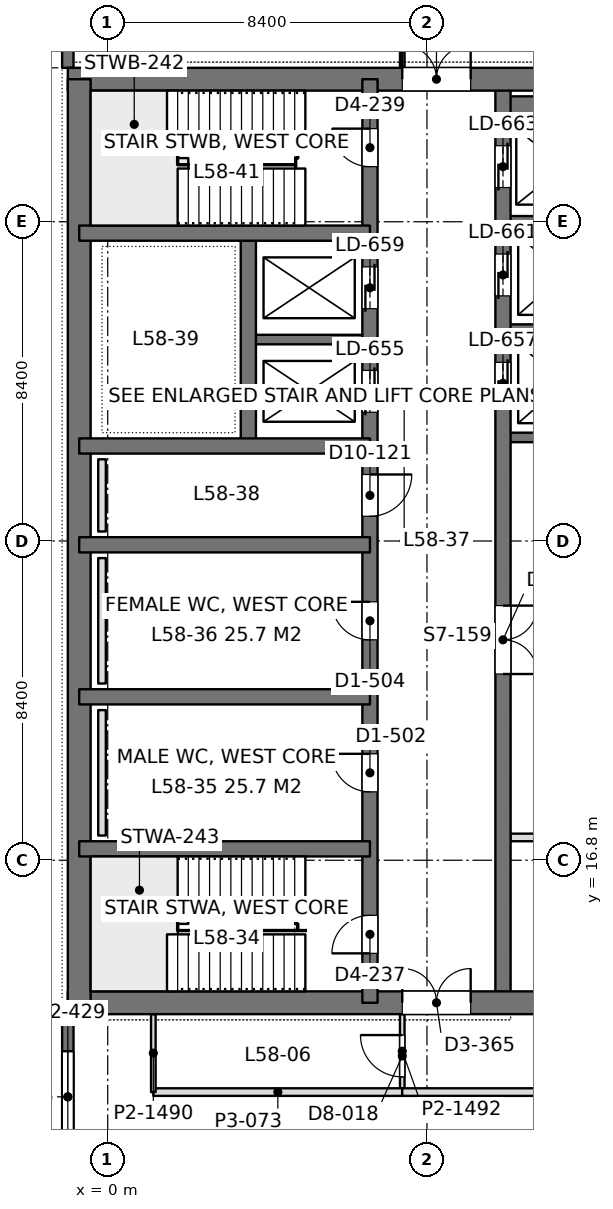
"""IFC4 building model, lengths in metres.
Left out: names, types, materials, properties, quantities, classifications, styles, units other than length and angle.
Written with IfcOpenShell. Run it as: python <this file> out.ifc"""

import sys

from ifc_helpers import new_model, si_unit, direction, frame, frame_2d, origin, place, context, subcontext, project, spatial, rectangle, extrude, element, fill, save


model = new_model("IFC4")
c1 = context("Model", 3, precision=1e-05, world=origin(), true_north=direction((0.0, 1.0)))
c2 = subcontext(c1, "Body", "Model", "MODEL_VIEW")
j1 = project(units=[si_unit("LENGTHUNIT", "METRE"), si_unit("PLANEANGLEUNIT", "RADIAN")], contexts=[c1])
p1 = place(None, origin())
s1 = spatial("IfcSite", under=j1, at=p1, CompositionType="ELEMENT")
p2 = place(p1, origin())
s2 = spatial("IfcBuilding", under=s1, at=p2, CompositionType="ELEMENT")
p3 = place(p2, frame((0.0, 0.0, 254.7)))
s3 = spatial("IfcBuildingStorey", under=s2, at=p3, CompositionType="ELEMENT", Elevation=254.7)
p4 = place(p3, frame((-1.05, 13.05, 0.0), z_axis=(0.0, 0.0, 1.0), x_axis=(1.0, 0.0, 0.0)))
e1 = element("IfcWall", 1, at=p4, inside=s3, PredefinedType="SHEAR", context=c2, shape_type="SweptSolid", body=[
    extrude(rectangle(XDim=17.7, YDim=0.6, at=frame_2d((8.85, 0.0))), origin(), (0.0, 0.0, 1.0), 4.5),
])
p5 = place(p4, frame((8.8, 0.0, 0.0)))
e2 = element("IfcOpeningElement", 2, at=p5, cuts=e1, PredefinedType="OPENING", context=c2, shape_type="SweptSolid", body=[
    extrude(rectangle(XDim=1.8, YDim=2.4, at=frame_2d((0.9, 1.2))), frame((0.0, 0.31, 0.0), z_axis=(0.0, -1.0, 0.0), x_axis=(1.0, 0.0, 0.0)), (0.0, 0.0, 1.0), 0.62),
])
p6 = place(p3, frame((-1.05, 37.35, 0.0), z_axis=(0.0, 0.0, 1.0), x_axis=(1.0, 0.0, 0.0)))
e3 = element("IfcWall", 3, at=p6, inside=s3, PredefinedType="SHEAR", context=c2, shape_type="SweptSolid", body=[
    extrude(rectangle(XDim=17.7, YDim=0.6, at=frame_2d((8.85, 0.0))), origin(), (0.0, 0.0, 1.0), 4.5),
])
p7 = place(p6, frame((8.8, 0.0, 0.0)))
e4 = element("IfcOpeningElement", 4, at=p7, cuts=e3, PredefinedType="OPENING", context=c2, shape_type="SweptSolid", body=[
    extrude(rectangle(XDim=1.8, YDim=2.4, at=frame_2d((0.9, 1.2))), frame((0.0, 0.31, 0.0), z_axis=(0.0, -1.0, 0.0), x_axis=(1.0, 0.0, 0.0)), (0.0, 0.0, 1.0), 0.62),
])
p8 = place(p3, frame((-0.75, 13.05, 0.0), z_axis=(0.0, 0.0, 1.0), x_axis=(0.0, 1.0, 0.0)))
e5 = element("IfcWall", 5, at=p8, inside=s3, PredefinedType="SHEAR", context=c2, shape_type="SweptSolid", body=[
    extrude(rectangle(XDim=24.3, YDim=0.6, at=frame_2d((12.15, 0.0))), origin(), (0.0, 0.0, 1.0), 4.5),
])
p9 = place(p3, frame((6.9, 13.05, 0.0), z_axis=(0.0, 0.0, 1.0), x_axis=(0.0, 1.0, 0.0)))
e6 = element("IfcWall", 6, at=p9, inside=s3, PredefinedType="SHEAR", context=c2, shape_type="SweptSolid", body=[
    extrude(rectangle(XDim=24.3, YDim=0.4, at=frame_2d((12.15, 0.0))), origin(), (0.0, 0.0, 1.0), 4.5),
])
p10 = place(p9, frame((1.3, 0.0, 0.0)))
e7 = element("IfcOpeningElement", 7, at=p10, cuts=e6, PredefinedType="OPENING", context=c2, shape_type="SweptSolid", body=[
    extrude(rectangle(XDim=1.0, YDim=2.2, at=frame_2d((0.5, 1.1))), frame((0.0, 0.21, 0.0), z_axis=(0.0, -1.0, 0.0), x_axis=(1.0, 0.0, 0.0)), (0.0, 0.0, 1.0), 0.42),
])
p11 = place(p9, frame((22.0, 0.0, 0.0)))
e8 = element("IfcOpeningElement", 8, at=p11, cuts=e6, PredefinedType="OPENING", context=c2, shape_type="SweptSolid", body=[
    extrude(rectangle(XDim=1.0, YDim=2.2, at=frame_2d((0.5, 1.1))), frame((0.0, 0.21, 0.0), z_axis=(0.0, -1.0, 0.0), x_axis=(1.0, 0.0, 0.0)), (0.0, 0.0, 1.0), 0.42),
])
p12 = place(p9, frame((5.55, 0.0, 0.0)))
e9 = element("IfcOpeningElement", 9, at=p12, cuts=e6, PredefinedType="OPENING", context=c2, shape_type="SweptSolid", body=[
    extrude(rectangle(XDim=1.0, YDim=2.2, at=frame_2d((0.5, 1.1))), frame((0.0, 0.21, 0.0), z_axis=(0.0, -1.0, 0.0), x_axis=(1.0, 0.0, 0.0)), (0.0, 0.0, 1.0), 0.42),
])
p13 = place(p9, frame((9.55, 0.0, 0.0)))
e10 = element("IfcOpeningElement", 10, at=p13, cuts=e6, PredefinedType="OPENING", context=c2, shape_type="SweptSolid", body=[
    extrude(rectangle(XDim=1.0, YDim=2.2, at=frame_2d((0.5, 1.1))), frame((0.0, 0.21, 0.0), z_axis=(0.0, -1.0, 0.0), x_axis=(1.0, 0.0, 0.0)), (0.0, 0.0, 1.0), 0.42),
])
p14 = place(p9, frame((12.8, 0.0, 0.0)))
e11 = element("IfcOpeningElement", 11, at=p14, cuts=e6, PredefinedType="OPENING", context=c2, shape_type="SweptSolid", body=[
    extrude(rectangle(XDim=1.1, YDim=2.2, at=frame_2d((0.55, 1.1))), frame((0.0, 0.21, 0.0), z_axis=(0.0, -1.0, 0.0), x_axis=(1.0, 0.0, 0.0)), (0.0, 0.0, 1.0), 0.42),
])
p15 = place(p9, frame((15.538, 0.0, 0.0)))
e12 = element("IfcOpeningElement", 12, at=p15, cuts=e6, PredefinedType="OPENING", context=c2, shape_type="SweptSolid", body=[
    extrude(rectangle(XDim=1.1, YDim=2.2, at=frame_2d((0.55, 1.1))), frame((0.0, 0.21, 0.0), z_axis=(0.0, -1.0, 0.0), x_axis=(1.0, 0.0, 0.0)), (0.0, 0.0, 1.0), 0.42),
])
p16 = place(p9, frame((18.262, 0.0, 0.0)))
e13 = element("IfcOpeningElement", 13, at=p16, cuts=e6, PredefinedType="OPENING", context=c2, shape_type="SweptSolid", body=[
    extrude(rectangle(XDim=1.1, YDim=2.2, at=frame_2d((0.55, 1.1))), frame((0.0, 0.21, 0.0), z_axis=(0.0, -1.0, 0.0), x_axis=(1.0, 0.0, 0.0)), (0.0, 0.0, 1.0), 0.42),
])
p17 = place(p3, frame((10.4, 13.05, 0.0), z_axis=(0.0, 0.0, 1.0), x_axis=(0.0, 1.0, 0.0)))
e14 = element("IfcWall", 14, at=p17, inside=s3, PredefinedType="SHEAR", context=c2, shape_type="SweptSolid", body=[
    extrude(rectangle(XDim=24.3, YDim=0.4, at=frame_2d((12.15, 0.0))), origin(), (0.0, 0.0, 1.0), 4.5),
])
p18 = place(p17, frame((15.75, 0.0, 0.0)))
e15 = element("IfcOpeningElement", 15, at=p18, cuts=e14, PredefinedType="OPENING", context=c2, shape_type="SweptSolid", body=[
    extrude(rectangle(XDim=1.1, YDim=2.2, at=frame_2d((0.55, 1.1))), frame((0.0, 0.21, 0.0), z_axis=(0.0, -1.0, 0.0), x_axis=(1.0, 0.0, 0.0)), (0.0, 0.0, 1.0), 0.42),
])
p19 = place(p17, frame((18.6, 0.0, 0.0)))
e16 = element("IfcOpeningElement", 16, at=p19, cuts=e14, PredefinedType="OPENING", context=c2, shape_type="SweptSolid", body=[
    extrude(rectangle(XDim=1.1, YDim=2.2, at=frame_2d((0.55, 1.1))), frame((0.0, 0.21, 0.0), z_axis=(0.0, -1.0, 0.0), x_axis=(1.0, 0.0, 0.0)), (0.0, 0.0, 1.0), 0.42),
])
p20 = place(p17, frame((21.45, 0.0, 0.0)))
e17 = element("IfcOpeningElement", 17, at=p20, cuts=e14, PredefinedType="OPENING", context=c2, shape_type="SweptSolid", body=[
    extrude(rectangle(XDim=1.1, YDim=2.2, at=frame_2d((0.55, 1.1))), frame((0.0, 0.21, 0.0), z_axis=(0.0, -1.0, 0.0), x_axis=(1.0, 0.0, 0.0)), (0.0, 0.0, 1.0), 0.42),
])
p21 = place(p17, frame((8.65, 0.0, 0.0)))
e18 = element("IfcOpeningElement", 18, at=p21, cuts=e14, PredefinedType="OPENING", context=c2, shape_type="SweptSolid", body=[
    extrude(rectangle(XDim=1.8, YDim=2.4, at=frame_2d((0.9, 1.2))), frame((0.0, 0.21, 0.0), z_axis=(0.0, -1.0, 0.0), x_axis=(1.0, 0.0, 0.0)), (0.0, 0.0, 1.0), 0.42),
])
for number, where, z_axis, x_axis in (
    (19, (-0.75, 17.1, 0.0), (0.0, 0.0, 1.0), (1.0, 0.0, 0.0)),
    (20, (-0.75, 21.1, 0.0), (0.0, 0.0, 1.0), (1.0, 0.0, 0.0)),
    (21, (-0.75, 25.1, 0.0), (0.0, 0.0, 1.0), (1.0, 0.0, 0.0)),
    (22, (-0.75, 27.7, 0.0), (0.0, 0.0, 1.0), (1.0, 0.0, 0.0)),
    (23, (-0.75, 33.3, 0.0), (0.0, 0.0, 1.0), (1.0, 0.0, 0.0)),
):
    element("IfcWall", number, at=place(p3, frame(where, z_axis=z_axis, x_axis=x_axis)), inside=s3, PredefinedType="SHEAR", context=c2, shape_type="SweptSolid", body=[
        extrude(rectangle(XDim=7.65, YDim=0.4, at=frame_2d((3.825, 0.0))), origin(), (0.0, 0.0, 1.0), 4.5),
    ])
p22 = place(p3, frame((3.7, 27.7, 0.0), z_axis=(0.0, 0.0, 1.0), x_axis=(0.0, 1.0, 0.0)))
e24 = element("IfcWall", 24, at=p22, inside=s3, PredefinedType="SHEAR", context=c2, shape_type="SweptSolid", body=[
    extrude(rectangle(XDim=5.6, YDim=0.4, at=frame_2d((2.8, 0.0))), origin(), (0.0, 0.0, 1.0), 4.5),
])
p23 = place(p3, frame((3.7, 30.5, 0.0), z_axis=(0.0, 0.0, 1.0), x_axis=(1.0, 0.0, 0.0)))
e25 = element("IfcWall", 25, at=p23, inside=s3, PredefinedType="SHEAR", context=c2, shape_type="SweptSolid", body=[
    extrude(rectangle(XDim=3.2, YDim=0.25, at=frame_2d((1.6, 0.0))), origin(), (0.0, 0.0, 1.0), 4.5),
])
p24 = place(p3, frame((10.4, 27.925, 0.0), z_axis=(0.0, 0.0, 1.0), x_axis=(1.0, 0.0, 0.0)))
e26 = element("IfcWall", 26, at=p24, inside=s3, PredefinedType="SHEAR", context=c2, shape_type="SweptSolid", body=[
    extrude(rectangle(XDim=5.95, YDim=0.25, at=frame_2d((2.975, 0.0))), origin(), (0.0, 0.0, 1.0), 4.5),
])
for number, where, z_axis, x_axis in (
    (27, (10.4, 30.775, 0.0), (0.0, 0.0, 1.0), (1.0, 0.0, 0.0)),
    (28, (10.4, 33.625, 0.0), (0.0, 0.0, 1.0), (1.0, 0.0, 0.0)),
):
    element("IfcWall", number, at=place(p3, frame(where, z_axis=z_axis, x_axis=x_axis)), inside=s3, PredefinedType="SHEAR", context=c2, shape_type="SweptSolid", body=[
        extrude(rectangle(XDim=3.2, YDim=0.25, at=frame_2d((1.6, 0.0))), origin(), (0.0, 0.0, 1.0), 4.5),
    ])
p25 = place(p3, frame((10.4, 36.625, 0.0), z_axis=(0.0, 0.0, 1.0), x_axis=(1.0, 0.0, 0.0)))
e29 = element("IfcWall", 29, at=p25, inside=s3, PredefinedType="SHEAR", context=c2, shape_type="SweptSolid", body=[
    extrude(rectangle(XDim=3.2, YDim=0.55, at=frame_2d((1.6, 0.0))), origin(), (0.0, 0.0, 1.0), 4.5),
])
p26 = place(p3, frame((-1.05, 8.4, 0.0), z_axis=(0.0, 0.0, 1.0), x_axis=(0.0, 1.0, 0.0)))
e30 = element("IfcWall", 30, at=p26, inside=s3, PredefinedType="SOLIDWALL", context=c2, shape_type="SweptSolid", body=[
    extrude(rectangle(XDim=4.35, YDim=0.3, at=frame_2d((2.175, 0.0))), origin(), (0.0, 0.0, 1.0), 4.35),
])
p27 = place(p26, frame((0.975, 0.0, 0.9)))
e31 = element("IfcOpeningElement", 31, at=p27, cuts=e30, PredefinedType="OPENING", context=c2, shape_type="SweptSolid", body=[
    extrude(rectangle(XDim=2.4, YDim=1.9, at=frame_2d((1.2, 0.95))), frame((0.0, 0.16, 0.0), z_axis=(0.0, -1.0, 0.0), x_axis=(1.0, 0.0, 0.0)), (0.0, 0.0, 1.0), 0.32),
])
p28 = place(p3, frame((-1.05, 37.65, 0.0), z_axis=(0.0, 0.0, 1.0), x_axis=(0.0, 1.0, 0.0)))
e32 = element("IfcWall", 32, at=p28, inside=s3, PredefinedType="SOLIDWALL", context=c2, shape_type="SweptSolid", body=[
    extrude(rectangle(XDim=4.35, YDim=0.3, at=frame_2d((2.175, 0.0))), origin(), (0.0, 0.0, 1.0), 4.35),
])
p29 = place(p28, frame((0.975, 0.0, 0.9)))
e33 = element("IfcOpeningElement", 33, at=p29, cuts=e32, PredefinedType="OPENING", context=c2, shape_type="SweptSolid", body=[
    extrude(rectangle(XDim=2.4, YDim=1.9, at=frame_2d((1.2, 0.95))), frame((0.0, 0.16, 0.0), z_axis=(0.0, -1.0, 0.0), x_axis=(1.0, 0.0, 0.0)), (0.0, 0.0, 1.0), 0.32),
])
p30 = place(p3, frame((10.598, 17.4, 0.0), z_axis=(0.0, 0.0, 1.0), x_axis=(1.0, 0.0, 0.0)))
e34 = element("IfcWall", 34, at=p30, inside=s3, PredefinedType="PARTITIONING", context=c2, shape_type="SweptSolid", body=[
    extrude(rectangle(XDim=5.904, YDim=0.2, at=frame_2d((2.952, 0.0))), origin(), (0.0, 0.0, 1.0), 3.8),
])
p31 = place(p3, frame((7.748, 10.7, 0.0), z_axis=(0.0, 0.0, 1.0), x_axis=(1.0, 0.0, 0.0)))
e35 = element("IfcWall", 35, at=p31, inside=s3, PredefinedType="PARTITIONING", context=c2, shape_type="SweptSolid", body=[
    extrude(rectangle(XDim=34.904, YDim=0.2, at=frame_2d((17.452, 0.0))), origin(), (0.0, 0.0, 1.0), 3.8),
])
p32 = place(p31, frame((4.919, 0.0, 0.0)))
e36 = element("IfcOpeningElement", 36, at=p32, cuts=e35, PredefinedType="OPENING", context=c2, shape_type="SweptSolid", body=[
    extrude(rectangle(XDim=1.8, YDim=2.2, at=frame_2d((0.9, 1.1))), frame((0.0, 0.11, 0.0), z_axis=(0.0, -1.0, 0.0), x_axis=(1.0, 0.0, 0.0)), (0.0, 0.0, 1.0), 0.22),
])
p33 = place(p31, frame((10.735, 0.0, 0.0)))
e37 = element("IfcOpeningElement", 37, at=p33, cuts=e35, PredefinedType="OPENING", context=c2, shape_type="SweptSolid", body=[
    extrude(rectangle(XDim=1.8, YDim=2.2, at=frame_2d((0.9, 1.1))), frame((0.0, 0.11, 0.0), z_axis=(0.0, -1.0, 0.0), x_axis=(1.0, 0.0, 0.0)), (0.0, 0.0, 1.0), 0.22),
])
p34 = place(p31, frame((22.369, 0.0, 0.0)))
e38 = element("IfcOpeningElement", 38, at=p34, cuts=e35, PredefinedType="OPENING", context=c2, shape_type="SweptSolid", body=[
    extrude(rectangle(XDim=1.8, YDim=2.2, at=frame_2d((0.9, 1.1))), frame((0.0, 0.11, 0.0), z_axis=(0.0, -1.0, 0.0), x_axis=(1.0, 0.0, 0.0)), (0.0, 0.0, 1.0), 0.22),
])
p35 = place(p31, frame((28.185, 0.0, 0.0)))
e39 = element("IfcOpeningElement", 39, at=p35, cuts=e35, PredefinedType="OPENING", context=c2, shape_type="SweptSolid", body=[
    extrude(rectangle(XDim=1.8, YDim=2.2, at=frame_2d((0.9, 1.1))), frame((0.0, 0.11, 0.0), z_axis=(0.0, -1.0, 0.0), x_axis=(1.0, 0.0, 0.0)), (0.0, 0.0, 1.0), 0.22),
])
p36 = place(p3, frame((7.75, 10.798, 0.0), z_axis=(0.0, 0.0, 1.0), x_axis=(0.0, 1.0, 0.0)))
e40 = element("IfcWall", 40, at=p36, inside=s3, PredefinedType="PARTITIONING", context=c2, shape_type="SweptSolid", body=[
    extrude(rectangle(XDim=1.954, YDim=0.12, at=frame_2d((0.977, 0.0))), origin(), (0.0, 0.0, 1.0), 4.35),
])
p37 = place(p36, frame((0.302, 0.0, 0.0)))
e41 = element("IfcOpeningElement", 41, at=p37, cuts=e40, PredefinedType="OPENING", context=c2, shape_type="SweptSolid", body=[
    extrude(rectangle(XDim=1.1, YDim=2.4, at=frame_2d((0.55, 1.2))), frame((0.0, 0.07, 0.0), z_axis=(0.0, -1.0, 0.0), x_axis=(1.0, 0.0, 0.0)), (0.0, 0.0, 1.0), 0.14),
])
p38 = place(p3, frame((1.2, 10.7, 0.0), z_axis=(0.0, 0.0, 1.0), x_axis=(1.0, 0.0, 0.0)))
e42 = element("IfcWall", 42, at=p38, inside=s3, PredefinedType="PARTITIONING", context=c2, shape_type="SweptSolid", body=[
    extrude(rectangle(XDim=6.552, YDim=0.2, at=frame_2d((3.276, 0.0))), origin(), (0.0, 0.0, 1.0), 4.35),
])
p39 = place(p3, frame((1.2, 10.7, 0.0), z_axis=(0.0, 0.0, 1.0), x_axis=(0.0, 1.0, 0.0)))
e43 = element("IfcWall", 43, at=p39, inside=s3, PredefinedType="PARTITIONING", context=c2, shape_type="SweptSolid", body=[
    extrude(rectangle(XDim=2.052, YDim=0.12, at=frame_2d((1.026, 0.0))), origin(), (0.0, 0.0, 1.0), 4.35),
])
p40 = place(p3, frame((7.75, 37.648, 0.0), z_axis=(0.0, 0.0, 1.0), x_axis=(0.0, 1.0, 0.0)))
e44 = element("IfcWall", 44, at=p40, inside=s3, PredefinedType="PARTITIONING", context=c2, shape_type="SweptSolid", body=[
    extrude(rectangle(XDim=1.954, YDim=0.12, at=frame_2d((0.977, 0.0))), origin(), (0.0, 0.0, 1.0), 4.35),
])
p41 = place(p40, frame((0.552, 0.0, 0.0)))
e45 = element("IfcOpeningElement", 45, at=p41, cuts=e44, PredefinedType="OPENING", context=c2, shape_type="SweptSolid", body=[
    extrude(rectangle(XDim=1.1, YDim=2.4, at=frame_2d((0.55, 1.2))), frame((0.0, 0.07, 0.0), z_axis=(0.0, -1.0, 0.0), x_axis=(1.0, 0.0, 0.0)), (0.0, 0.0, 1.0), 0.14),
])
p42 = place(p3, frame((1.2, 37.648, 0.0), z_axis=(0.0, 0.0, 1.0), x_axis=(0.0, 1.0, 0.0)))
e46 = element("IfcWall", 46, at=p42, inside=s3, PredefinedType="PARTITIONING", context=c2, shape_type="SweptSolid", body=[
    extrude(rectangle(XDim=2.052, YDim=0.12, at=frame_2d((1.026, 0.0))), origin(), (0.0, 0.0, 1.0), 4.35),
])
for number, where, z_axis, x_axis in (
    (47, (-0.15, 17.45, 0.0), (0.0, 0.0, 1.0), (0.0, 1.0, 0.0)),
    (48, (-0.15, 21.45, 0.0), (0.0, 0.0, 1.0), (0.0, 1.0, 0.0)),
):
    element("IfcWall", number, at=place(p3, frame(where, z_axis=z_axis, x_axis=x_axis)), inside=s3, PredefinedType="PLUMBINGWALL", context=c2, shape_type="SweptSolid", body=[
        extrude(rectangle(XDim=3.3, YDim=0.2, at=frame_2d((1.65, 0.0))), origin(), (0.0, 0.0, 1.0), 1.2),
    ])
p43 = place(p3, frame((-0.15, 25.45, 0.0), z_axis=(0.0, 0.0, 1.0), x_axis=(0.0, 1.0, 0.0)))
e49 = element("IfcWall", 49, at=p43, inside=s3, PredefinedType="PLUMBINGWALL", context=c2, shape_type="SweptSolid", body=[
    extrude(rectangle(XDim=1.9, YDim=0.2, at=frame_2d((0.95, 0.0))), origin(), (0.0, 0.0, 1.0), 1.2),
])
p44 = place(p27, origin())
e50 = element("IfcWindow", 50, at=p44, inside=s3, PartitioningType="SINGLE_PANEL", PredefinedType="WINDOW", context=c2, shape_type="SweptSolid", body=[
    extrude(rectangle(XDim=2.4, YDim=1.9, at=frame_2d((1.2, 0.95))), frame((0.0, 0.03, 0.0), z_axis=(0.0, -1.0, 0.0), x_axis=(1.0, 0.0, 0.0)), (0.0, 0.0, 1.0), 0.06),
])
fill(e31, e50)
p45 = place(p5, origin())
e51 = element("IfcDoor", 51, at=p45, inside=s3, OperationType="DOUBLE_DOOR_SINGLE_SWING", PredefinedType="DOOR", context=c2, shape_type="SweptSolid", body=[
    extrude(rectangle(XDim=1.8, YDim=2.4, at=frame_2d((0.9, 1.2))), frame((0.0, 0.025, 0.0), z_axis=(0.0, -1.0, 0.0), x_axis=(1.0, 0.0, 0.0)), (0.0, 0.0, 1.0), 0.05),
])
fill(e2, e51)
p46 = place(p7, origin())
e52 = element("IfcDoor", 52, at=p46, inside=s3, OperationType="DOUBLE_DOOR_SINGLE_SWING", PredefinedType="DOOR", context=c2, shape_type="SweptSolid", body=[
    extrude(rectangle(XDim=1.8, YDim=2.4, at=frame_2d((0.9, 1.2))), frame((0.0, 0.025, 0.0), z_axis=(0.0, -1.0, 0.0), x_axis=(1.0, 0.0, 0.0)), (0.0, 0.0, 1.0), 0.05),
])
fill(e4, e52)
p47 = place(p10, origin())
e53 = element("IfcDoor", 53, at=p47, inside=s3, OperationType="SINGLE_SWING_LEFT", PredefinedType="DOOR", context=c2, shape_type="SweptSolid", body=[
    extrude(rectangle(XDim=1.0, YDim=2.2, at=frame_2d((0.5, 1.1))), frame((0.0, 0.025, 0.0), z_axis=(0.0, -1.0, 0.0), x_axis=(1.0, 0.0, 0.0)), (0.0, 0.0, 1.0), 0.05),
])
fill(e7, e53)
p48 = place(p11, origin())
e54 = element("IfcDoor", 54, at=p48, inside=s3, OperationType="SINGLE_SWING_RIGHT", PredefinedType="DOOR", context=c2, shape_type="SweptSolid", body=[
    extrude(rectangle(XDim=1.0, YDim=2.2, at=frame_2d((0.5, 1.1))), frame((0.0, 0.025, 0.0), z_axis=(0.0, -1.0, 0.0), x_axis=(1.0, 0.0, 0.0)), (0.0, 0.0, 1.0), 0.05),
])
fill(e8, e54)
p49 = place(p12, origin())
e55 = element("IfcDoor", 55, at=p49, inside=s3, OperationType="SINGLE_SWING_RIGHT", PredefinedType="DOOR", context=c2, shape_type="SweptSolid", body=[
    extrude(rectangle(XDim=1.0, YDim=2.2, at=frame_2d((0.5, 1.1))), frame((0.0, 0.025, 0.0), z_axis=(0.0, -1.0, 0.0), x_axis=(1.0, 0.0, 0.0)), (0.0, 0.0, 1.0), 0.05),
])
fill(e9, e55)
p50 = place(p13, origin())
e56 = element("IfcDoor", 56, at=p50, inside=s3, OperationType="SINGLE_SWING_RIGHT", PredefinedType="DOOR", context=c2, shape_type="SweptSolid", body=[
    extrude(rectangle(XDim=1.0, YDim=2.2, at=frame_2d((0.5, 1.1))), frame((0.0, 0.025, 0.0), z_axis=(0.0, -1.0, 0.0), x_axis=(1.0, 0.0, 0.0)), (0.0, 0.0, 1.0), 0.05),
])
fill(e10, e56)
p51 = place(p14, frame((1.1, 0.0, 0.0), z_axis=(0.0, 0.0, 1.0), x_axis=(-1.0, 0.0, 0.0)))
e57 = element("IfcDoor", 57, at=p51, inside=s3, OperationType="SINGLE_SWING_LEFT", PredefinedType="DOOR", context=c2, shape_type="SweptSolid", body=[
    extrude(rectangle(XDim=1.1, YDim=2.2, at=frame_2d((0.55, 1.1))), frame((0.0, 0.025, 0.0), z_axis=(0.0, -1.0, 0.0), x_axis=(1.0, 0.0, 0.0)), (0.0, 0.0, 1.0), 0.05),
])
fill(e11, e57)
p52 = place(p18, origin())
e58 = element("IfcDoor", 58, at=p52, inside=s3, OperationType="DOUBLE_DOOR_SLIDING", PredefinedType="DOOR", context=c2, shape_type="SweptSolid", body=[
    extrude(rectangle(XDim=1.1, YDim=2.2, at=frame_2d((0.55, 1.1))), frame((0.0, 0.025, 0.0), z_axis=(0.0, -1.0, 0.0), x_axis=(1.0, 0.0, 0.0)), (0.0, 0.0, 1.0), 0.05),
])
fill(e15, e58)
p53 = place(p19, origin())
e59 = element("IfcDoor", 59, at=p53, inside=s3, OperationType="DOUBLE_DOOR_SLIDING", PredefinedType="DOOR", context=c2, shape_type="SweptSolid", body=[
    extrude(rectangle(XDim=1.1, YDim=2.2, at=frame_2d((0.55, 1.1))), frame((0.0, 0.025, 0.0), z_axis=(0.0, -1.0, 0.0), x_axis=(1.0, 0.0, 0.0)), (0.0, 0.0, 1.0), 0.05),
])
fill(e16, e59)
p54 = place(p20, origin())
e60 = element("IfcDoor", 60, at=p54, inside=s3, OperationType="DOUBLE_DOOR_SLIDING", PredefinedType="DOOR", context=c2, shape_type="SweptSolid", body=[
    extrude(rectangle(XDim=1.1, YDim=2.2, at=frame_2d((0.55, 1.1))), frame((0.0, 0.025, 0.0), z_axis=(0.0, -1.0, 0.0), x_axis=(1.0, 0.0, 0.0)), (0.0, 0.0, 1.0), 0.05),
])
fill(e17, e60)
p55 = place(p15, origin())
e61 = element("IfcDoor", 61, at=p55, inside=s3, OperationType="DOUBLE_DOOR_SLIDING", PredefinedType="DOOR", context=c2, shape_type="SweptSolid", body=[
    extrude(rectangle(XDim=1.1, YDim=2.2, at=frame_2d((0.55, 1.1))), frame((0.0, 0.025, 0.0), z_axis=(0.0, -1.0, 0.0), x_axis=(1.0, 0.0, 0.0)), (0.0, 0.0, 1.0), 0.05),
])
fill(e12, e61)
p56 = place(p16, origin())
e62 = element("IfcDoor", 62, at=p56, inside=s3, OperationType="DOUBLE_DOOR_SLIDING", PredefinedType="DOOR", context=c2, shape_type="SweptSolid", body=[
    extrude(rectangle(XDim=1.1, YDim=2.2, at=frame_2d((0.55, 1.1))), frame((0.0, 0.025, 0.0), z_axis=(0.0, -1.0, 0.0), x_axis=(1.0, 0.0, 0.0)), (0.0, 0.0, 1.0), 0.05),
])
fill(e13, e62)
p57 = place(p21, frame((1.8, 0.0, 0.0), z_axis=(0.0, 0.0, 1.0), x_axis=(-1.0, 0.0, 0.0)))
e63 = element("IfcDoor", 63, at=p57, inside=s3, OperationType="DOUBLE_DOOR_SINGLE_SWING", PredefinedType="DOOR", context=c2, shape_type="SweptSolid", body=[
    extrude(rectangle(XDim=1.8, YDim=2.4, at=frame_2d((0.9, 1.2))), frame((0.0, 0.025, 0.0), z_axis=(0.0, -1.0, 0.0), x_axis=(1.0, 0.0, 0.0)), (0.0, 0.0, 1.0), 0.05),
])
fill(e18, e63)
p58 = place(p37, origin())
e64 = element("IfcDoor", 64, at=p58, inside=s3, OperationType="SINGLE_SWING_RIGHT", PredefinedType="DOOR", context=c2, shape_type="SweptSolid", body=[
    extrude(rectangle(XDim=1.1, YDim=2.4, at=frame_2d((0.55, 1.2))), frame((0.0, 0.025, 0.0), z_axis=(0.0, -1.0, 0.0), x_axis=(1.0, 0.0, 0.0)), (0.0, 0.0, 1.0), 0.05),
])
fill(e41, e64)
save(model, sys.argv[1])
